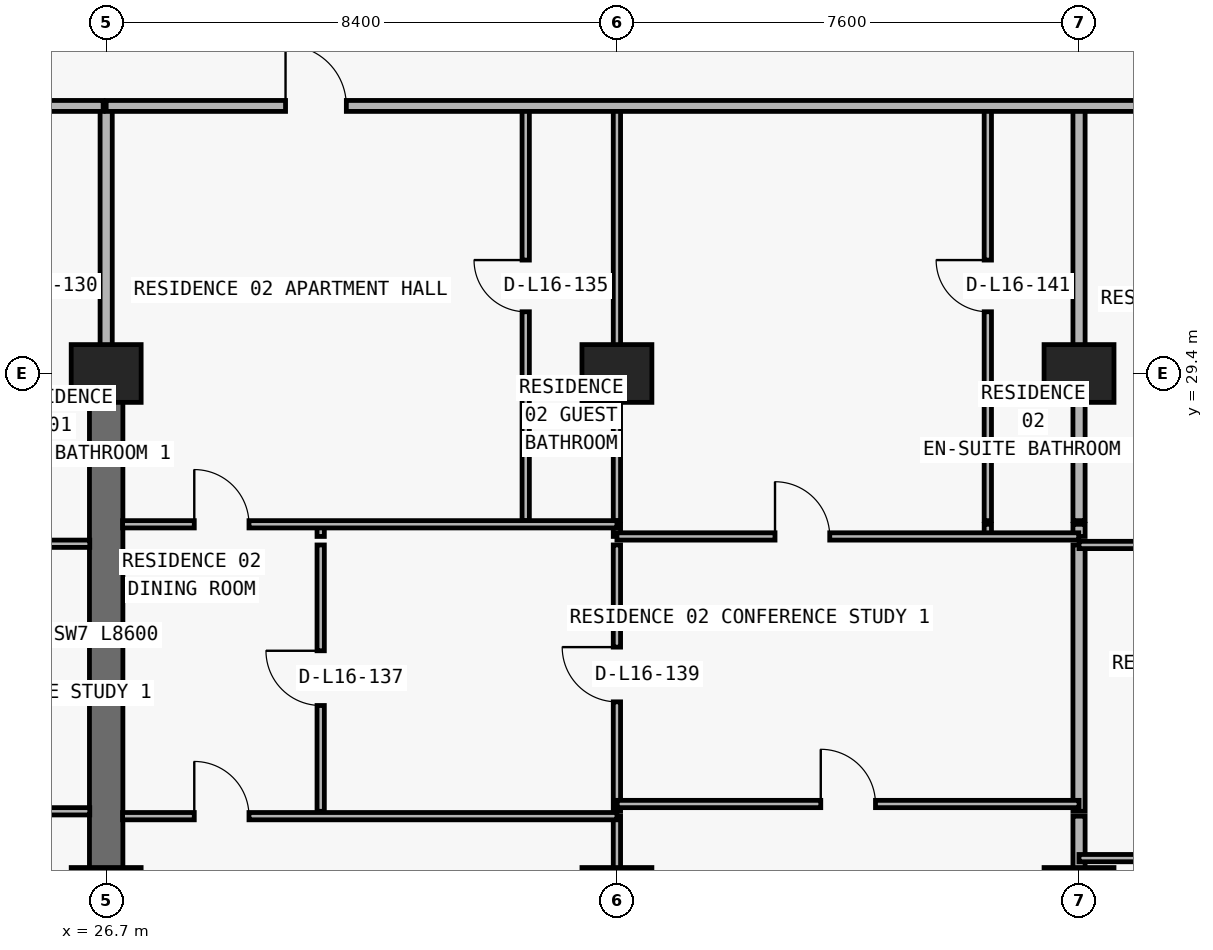
"""IFC4 building model, lengths in metres.
Left out: names, types, materials, properties, quantities, classifications, styles, units other than length and angle.
Written with IfcOpenShell. Run it as: python <this file> out.ifc"""

import sys

from ifc_helpers import new_model, si_unit, direction, frame, frame_2d, origin, origin_2d, place, context, subcontext, project, spatial, rectangle, extrude, element, fill, save


model = new_model("IFC4")
c1 = context("Model", 3, precision=1e-05, world=origin(), true_north=direction((0.0, 1.0)))
c2 = subcontext(c1, "Body", "Model", "MODEL_VIEW")
j1 = project(units=[si_unit("LENGTHUNIT", "METRE"), si_unit("PLANEANGLEUNIT", "RADIAN")], contexts=[c1])
p1 = place(None, origin())
s1 = spatial("IfcSite", under=j1, at=p1, CompositionType="ELEMENT")
p2 = place(p1, origin())
s2 = spatial("IfcBuilding", under=s1, at=p2, CompositionType="ELEMENT")
p3 = place(p2, frame((0.0, 0.0, 63.0)))
s3 = spatial("IfcBuildingStorey", under=s2, at=p3, CompositionType="ELEMENT", Elevation=63.0)
for number, where, z_axis, x_axis in (
    (1, (26.7, 20.8, 0.0), (0.0, 0.0, 1.0), (1.0, 0.0, 0.0)),
    (2, (35.1, 20.8, 0.0), (0.0, 0.0, 1.0), (1.0, 0.0, 0.0)),
    (3, (42.7, 20.8, 0.0), (0.0, 0.0, 1.0), (1.0, 0.0, 0.0)),
    (4, (26.7, 29.4, 0.0), (0.0, 0.0, 1.0), (1.0, 0.0, 0.0)),
    (5, (35.1, 29.4, 0.0), (0.0, 0.0, 1.0), (1.0, 0.0, 0.0)),
    (6, (42.7, 29.4, 0.0), (0.0, 0.0, 1.0), (1.0, 0.0, 0.0)),
):
    element("IfcColumn", number, at=place(p3, frame(where, z_axis=z_axis, x_axis=x_axis)), inside=s3, PredefinedType="COLUMN", context=c2, shape_type="SweptSolid", body=[
        extrude(rectangle(XDim=1.15, YDim=0.95, at=origin_2d()), origin(), (0.0, 0.0, 1.0), 3.05),
    ])
p4 = place(p3, frame((26.7, 20.8, 0.0), z_axis=(0.0, 0.0, 1.0), x_axis=(0.0, 1.0, 0.0)))
e7 = element("IfcWall", 7, at=p4, inside=s3, PredefinedType="SHEAR", context=c2, shape_type="SweptSolid", body=[
    extrude(rectangle(XDim=8.6, YDim=0.55, at=frame_2d((4.3, 0.0))), origin(), (0.0, 0.0, 1.0), 3.05),
])
p5 = place(p3, frame((26.7, 29.405, 0.0), z_axis=(0.0, 0.0, 1.0), x_axis=(0.0, 1.0, 0.0)))
e8 = element("IfcWall", 8, at=p5, inside=s3, PredefinedType="PARTITIONING", context=c2, shape_type="SweptSolid", body=[
    extrude(rectangle(XDim=4.395, YDim=0.2, at=frame_2d((2.198, 0.0))), origin(), (0.0, 0.0, 1.0), 2.335),
])
p6 = place(p3, frame((30.228, 22.2, 0.0), z_axis=(0.0, 0.0, 1.0), x_axis=(0.0, 1.0, 0.0)))
e9 = element("IfcWall", 9, at=p6, inside=s3, PredefinedType="PARTITIONING", context=c2, shape_type="SweptSolid", body=[
    extrude(rectangle(XDim=4.38, YDim=0.12, at=frame_2d((2.19, 0.0))), origin(), (0.0, 0.0, 1.0), 3.05),
])
p7 = place(p6, frame((1.74, 0.0, 0.0)))
e10 = element("IfcOpeningElement", 10, at=p7, cuts=e9, PredefinedType="OPENING", context=c2, shape_type="SweptSolid", body=[
    extrude(rectangle(XDim=0.9, YDim=2.15, at=frame_2d((0.45, 1.075))), frame((0.0, 0.07, 0.0), z_axis=(0.0, -1.0, 0.0), x_axis=(1.0, 0.0, 0.0)), (0.0, 0.0, 1.0), 0.14),
])
p8 = place(p3, frame((30.228, 26.72, 0.0), z_axis=(0.0, 0.0, 1.0), x_axis=(0.0, 1.0, 0.0)))
e11 = element("IfcWall", 11, at=p8, inside=s3, PredefinedType="PARTITIONING", context=c2, shape_type="SweptSolid", body=[
    extrude(rectangle(XDim=0.2, YDim=0.12, at=frame_2d((0.1, 0.0))), origin(), (0.0, 0.0, 1.0), 3.05),
])
p9 = place(p3, frame((33.6, 26.98, 0.0), z_axis=(0.0, 0.0, 1.0), x_axis=(0.0, 1.0, 0.0)))
e12 = element("IfcWall", 12, at=p9, inside=s3, PredefinedType="PARTITIONING", context=c2, shape_type="SweptSolid", body=[
    extrude(rectangle(XDim=6.82, YDim=0.12, at=frame_2d((3.41, 0.0))), origin(), (0.0, 0.0, 1.0), 3.05),
])
p10 = place(p9, frame((3.435, 0.0, 0.0)))
e13 = element("IfcOpeningElement", 13, at=p10, cuts=e12, PredefinedType="OPENING", context=c2, shape_type="SweptSolid", body=[
    extrude(rectangle(XDim=0.85, YDim=2.1, at=frame_2d((0.425, 1.05))), frame((0.0, 0.07, 0.0), z_axis=(0.0, -1.0, 0.0), x_axis=(1.0, 0.0, 0.0)), (0.0, 0.0, 1.0), 0.14),
])
p11 = place(p3, frame((35.1, 6.24, 0.0), z_axis=(0.0, 0.0, 1.0), x_axis=(0.0, 1.0, 0.0)))
e14 = element("IfcWall", 14, at=p11, inside=s3, PredefinedType="PARTITIONING", context=c2, shape_type="SweptSolid", body=[
    extrude(rectangle(XDim=15.88, YDim=0.12, at=frame_2d((7.94, 0.0))), origin(), (0.0, 0.0, 1.0), 2.11),
])
p12 = place(p3, frame((35.1, 22.2, 0.0), z_axis=(0.0, 0.0, 1.0), x_axis=(0.0, 1.0, 0.0)))
e15 = element("IfcWall", 15, at=p12, inside=s3, PredefinedType="PARTITIONING", context=c2, shape_type="SweptSolid", body=[
    extrude(rectangle(XDim=4.38, YDim=0.12, at=frame_2d((2.19, 0.0))), origin(), (0.0, 0.0, 1.0), 2.11),
])
p13 = place(p12, frame((1.8, 0.0, 0.0)))
e16 = element("IfcOpeningElement", 16, at=p13, cuts=e15, PredefinedType="OPENING", context=c2, shape_type="SweptSolid", body=[
    extrude(rectangle(XDim=0.9, YDim=2.06, at=frame_2d((0.45, 1.03))), frame((0.0, 0.07, 0.0), z_axis=(0.0, -1.0, 0.0), x_axis=(1.0, 0.0, 0.0)), (0.0, 0.0, 1.0), 0.14),
])
p14 = place(p3, frame((35.1, 26.72, 0.0), z_axis=(0.0, 0.0, 1.0), x_axis=(0.0, 1.0, 0.0)))
e17 = element("IfcWall", 17, at=p14, inside=s3, PredefinedType="PARTITIONING", context=c2, shape_type="SweptSolid", body=[
    extrude(rectangle(XDim=0.2, YDim=0.12, at=frame_2d((0.1, 0.0))), origin(), (0.0, 0.0, 1.0), 2.11),
])
p15 = place(p3, frame((35.1, 26.98, 0.0), z_axis=(0.0, 0.0, 1.0), x_axis=(0.0, 1.0, 0.0)))
e18 = element("IfcWall", 18, at=p15, inside=s3, PredefinedType="PARTITIONING", context=c2, shape_type="SweptSolid", body=[
    extrude(rectangle(XDim=6.82, YDim=0.12, at=frame_2d((3.41, 0.0))), origin(), (0.0, 0.0, 1.0), 2.11),
])
p16 = place(p3, frame((41.2, 26.72, 0.0), z_axis=(0.0, 0.0, 1.0), x_axis=(0.0, 1.0, 0.0)))
e19 = element("IfcWall", 19, at=p16, inside=s3, PredefinedType="PARTITIONING", context=c2, shape_type="SweptSolid", body=[
    extrude(rectangle(XDim=0.2, YDim=0.12, at=frame_2d((0.1, 0.0))), origin(), (0.0, 0.0, 1.0), 3.05),
])
p17 = place(p3, frame((41.2, 26.98, 0.0), z_axis=(0.0, 0.0, 1.0), x_axis=(0.0, 1.0, 0.0)))
e20 = element("IfcWall", 20, at=p17, inside=s3, PredefinedType="PARTITIONING", context=c2, shape_type="SweptSolid", body=[
    extrude(rectangle(XDim=6.82, YDim=0.12, at=frame_2d((3.41, 0.0))), origin(), (0.0, 0.0, 1.0), 3.05),
])
p18 = place(p17, frame((3.435, 0.0, 0.0)))
e21 = element("IfcOpeningElement", 21, at=p18, cuts=e20, PredefinedType="OPENING", context=c2, shape_type="SweptSolid", body=[
    extrude(rectangle(XDim=0.85, YDim=2.1, at=frame_2d((0.425, 1.05))), frame((0.0, 0.07, 0.0), z_axis=(0.0, -1.0, 0.0), x_axis=(1.0, 0.0, 0.0)), (0.0, 0.0, 1.0), 0.14),
])
p19 = place(p3, frame((42.7, 6.24, 0.0), z_axis=(0.0, 0.0, 1.0), x_axis=(0.0, 1.0, 0.0)))
e22 = element("IfcWall", 22, at=p19, inside=s3, PredefinedType="PARTITIONING", context=c2, shape_type="SweptSolid", body=[
    extrude(rectangle(XDim=15.88, YDim=0.2, at=frame_2d((7.94, 0.0))), origin(), (0.0, 0.0, 1.0), 2.11),
])
p20 = place(p3, frame((42.7, 22.2, 0.0), z_axis=(0.0, 0.0, 1.0), x_axis=(0.0, 1.0, 0.0)))
e23 = element("IfcWall", 23, at=p20, inside=s3, PredefinedType="PARTITIONING", context=c2, shape_type="SweptSolid", body=[
    extrude(rectangle(XDim=4.38, YDim=0.2, at=frame_2d((2.19, 0.0))), origin(), (0.0, 0.0, 1.0), 2.11),
])
p21 = place(p3, frame((42.7, 26.72, 0.0), z_axis=(0.0, 0.0, 1.0), x_axis=(0.0, 1.0, 0.0)))
e24 = element("IfcWall", 24, at=p21, inside=s3, PredefinedType="PARTITIONING", context=c2, shape_type="SweptSolid", body=[
    extrude(rectangle(XDim=0.2, YDim=0.2, at=frame_2d((0.1, 0.0))), origin(), (0.0, 0.0, 1.0), 2.11),
])
p22 = place(p3, frame((42.7, 26.98, 0.0), z_axis=(0.0, 0.0, 1.0), x_axis=(0.0, 1.0, 0.0)))
e25 = element("IfcWall", 25, at=p22, inside=s3, PredefinedType="PARTITIONING", context=c2, shape_type="SweptSolid", body=[
    extrude(rectangle(XDim=6.82, YDim=0.2, at=frame_2d((3.41, 0.0))), origin(), (0.0, 0.0, 1.0), 2.11),
])
p23 = place(p3, frame((42.7, 21.43, 0.0), z_axis=(0.0, 0.0, 1.0), x_axis=(1.0, 0.0, 0.0)))
e26 = element("IfcWall", 26, at=p23, inside=s3, PredefinedType="PARTITIONING", context=c2, shape_type="SweptSolid", body=[
    extrude(rectangle(XDim=8.13, YDim=0.12, at=frame_2d((4.065, 0.0))), origin(), (0.0, 0.0, 1.0), 3.05),
])
p24 = place(p23, frame((1.524, 0.0, 0.0)))
e27 = element("IfcOpeningElement", 27, at=p24, cuts=e26, PredefinedType="OPENING", context=c2, shape_type="SweptSolid", body=[
    extrude(rectangle(XDim=0.9, YDim=2.15, at=frame_2d((0.45, 1.075))), frame((0.0, 0.07, 0.0), z_axis=(0.0, -1.0, 0.0), x_axis=(1.0, 0.0, 0.0)), (0.0, 0.0, 1.0), 0.14),
])
p25 = place(p23, frame((5.758, 0.0, 0.0)))
e28 = element("IfcOpeningElement", 28, at=p25, cuts=e26, PredefinedType="OPENING", context=c2, shape_type="SweptSolid", body=[
    extrude(rectangle(XDim=0.9, YDim=2.15, at=frame_2d((0.45, 1.075))), frame((0.0, 0.07, 0.0), z_axis=(0.0, -1.0, 0.0), x_axis=(1.0, 0.0, 0.0)), (0.0, 0.0, 1.0), 0.14),
])
p26 = place(p3, frame((26.97, 22.12, 0.0), z_axis=(0.0, 0.0, 1.0), x_axis=(1.0, 0.0, 0.0)))
e29 = element("IfcWall", 29, at=p26, inside=s3, PredefinedType="PARTITIONING", context=c2, shape_type="SweptSolid", body=[
    extrude(rectangle(XDim=8.13, YDim=0.12, at=frame_2d((4.065, 0.0))), origin(), (0.0, 0.0, 1.0), 3.05),
])
p27 = place(p26, frame((1.179, 0.0, 0.0)))
e30 = element("IfcOpeningElement", 30, at=p27, cuts=e29, PredefinedType="OPENING", context=c2, shape_type="SweptSolid", body=[
    extrude(rectangle(XDim=0.9, YDim=2.15, at=frame_2d((0.45, 1.075))), frame((0.0, 0.07, 0.0), z_axis=(0.0, -1.0, 0.0), x_axis=(1.0, 0.0, 0.0)), (0.0, 0.0, 1.0), 0.14),
])
p28 = place(p3, frame((18.305, 22.2, 0.0), z_axis=(0.0, 0.0, 1.0), x_axis=(1.0, 0.0, 0.0)))
e31 = element("IfcWall", 31, at=p28, inside=s3, PredefinedType="PARTITIONING", context=c2, shape_type="SweptSolid", body=[
    extrude(rectangle(XDim=8.125, YDim=0.12, at=frame_2d((4.062, 0.0))), origin(), (0.0, 0.0, 1.0), 3.05),
])
p29 = place(p28, frame((3.613, 0.0, 0.0)))
e32 = element("IfcOpeningElement", 32, at=p29, cuts=e31, PredefinedType="OPENING", context=c2, shape_type="SweptSolid", body=[
    extrude(rectangle(XDim=0.9, YDim=2.15, at=frame_2d((0.45, 1.075))), frame((0.0, 0.07, 0.0), z_axis=(0.0, -1.0, 0.0), x_axis=(1.0, 0.0, 0.0)), (0.0, 0.0, 1.0), 0.14),
])
p30 = place(p3, frame((35.105, 22.32, 0.0), z_axis=(0.0, 0.0, 1.0), x_axis=(1.0, 0.0, 0.0)))
e33 = element("IfcWall", 33, at=p30, inside=s3, PredefinedType="PARTITIONING", context=c2, shape_type="SweptSolid", body=[
    extrude(rectangle(XDim=7.595, YDim=0.12, at=frame_2d((3.797, 0.0))), origin(), (0.0, 0.0, 1.0), 3.05),
])
p31 = place(p30, frame((3.347, 0.0, 0.0)))
e34 = element("IfcOpeningElement", 34, at=p31, cuts=e33, PredefinedType="OPENING", context=c2, shape_type="SweptSolid", body=[
    extrude(rectangle(XDim=0.9, YDim=2.15, at=frame_2d((0.45, 1.075))), frame((0.0, 0.07, 0.0), z_axis=(0.0, -1.0, 0.0), x_axis=(1.0, 0.0, 0.0)), (0.0, 0.0, 1.0), 0.14),
])
p32 = place(p3, frame((42.7, 26.58, 0.0), z_axis=(0.0, 0.0, 1.0), x_axis=(1.0, 0.0, 0.0)))
e35 = element("IfcWall", 35, at=p32, inside=s3, PredefinedType="PARTITIONING", context=c2, shape_type="SweptSolid", body=[
    extrude(rectangle(XDim=8.13, YDim=0.12, at=frame_2d((4.065, 0.0))), origin(), (0.0, 0.0, 1.0), 3.05),
])
p33 = place(p32, frame((1.693, 0.0, 0.0)))
e36 = element("IfcOpeningElement", 36, at=p33, cuts=e35, PredefinedType="OPENING", context=c2, shape_type="SweptSolid", body=[
    extrude(rectangle(XDim=0.9, YDim=2.15, at=frame_2d((0.45, 1.075))), frame((0.0, 0.07, 0.0), z_axis=(0.0, -1.0, 0.0), x_axis=(1.0, 0.0, 0.0)), (0.0, 0.0, 1.0), 0.14),
])
p34 = place(p3, frame((18.3, 26.6, 0.0), z_axis=(0.0, 0.0, 1.0), x_axis=(1.0, 0.0, 0.0)))
e37 = element("IfcWall", 37, at=p34, inside=s3, PredefinedType="PARTITIONING", context=c2, shape_type="SweptSolid", body=[
    extrude(rectangle(XDim=8.13, YDim=0.12, at=frame_2d((4.065, 0.0))), origin(), (0.0, 0.0, 1.0), 3.05),
])
p35 = place(p34, frame((3.0, 0.0, 0.0)))
e38 = element("IfcOpeningElement", 38, at=p35, cuts=e37, PredefinedType="OPENING", context=c2, shape_type="SweptSolid", body=[
    extrude(rectangle(XDim=0.9, YDim=2.15, at=frame_2d((0.45, 1.075))), frame((0.0, 0.07, 0.0), z_axis=(0.0, -1.0, 0.0), x_axis=(1.0, 0.0, 0.0)), (0.0, 0.0, 1.0), 0.14),
])
p36 = place(p3, frame((35.1, 26.72, 0.0), z_axis=(0.0, 0.0, 1.0), x_axis=(1.0, 0.0, 0.0)))
e39 = element("IfcWall", 39, at=p36, inside=s3, PredefinedType="PARTITIONING", context=c2, shape_type="SweptSolid", body=[
    extrude(rectangle(XDim=7.595, YDim=0.12, at=frame_2d((3.797, 0.0))), origin(), (0.0, 0.0, 1.0), 3.05),
])
p37 = place(p36, frame((2.6, 0.0, 0.0)))
e40 = element("IfcOpeningElement", 40, at=p37, cuts=e39, PredefinedType="OPENING", context=c2, shape_type="SweptSolid", body=[
    extrude(rectangle(XDim=0.9, YDim=2.15, at=frame_2d((0.45, 1.075))), frame((0.0, 0.07, 0.0), z_axis=(0.0, -1.0, 0.0), x_axis=(1.0, 0.0, 0.0)), (0.0, 0.0, 1.0), 0.14),
])
p38 = place(p3, frame((26.97, 26.92, 0.0), z_axis=(0.0, 0.0, 1.0), x_axis=(1.0, 0.0, 0.0)))
e41 = element("IfcWall", 41, at=p38, inside=s3, PredefinedType="PARTITIONING", context=c2, shape_type="SweptSolid", body=[
    extrude(rectangle(XDim=8.13, YDim=0.12, at=frame_2d((4.065, 0.0))), origin(), (0.0, 0.0, 1.0), 3.05),
])
p39 = place(p38, frame((1.179, 0.0, 0.0)))
e42 = element("IfcOpeningElement", 42, at=p39, cuts=e41, PredefinedType="OPENING", context=c2, shape_type="SweptSolid", body=[
    extrude(rectangle(XDim=0.9, YDim=2.15, at=frame_2d((0.45, 1.075))), frame((0.0, 0.07, 0.0), z_axis=(0.0, -1.0, 0.0), x_axis=(1.0, 0.0, 0.0)), (0.0, 0.0, 1.0), 0.14),
])
p40 = place(p3, frame((5.105, 33.8, 0.0), z_axis=(0.0, 0.0, 1.0), x_axis=(1.0, 0.0, 0.0)))
e43 = element("IfcWall", 43, at=p40, inside=s3, PredefinedType="PARTITIONING", context=c2, shape_type="SweptSolid", body=[
    extrude(rectangle(XDim=21.545, YDim=0.18, at=frame_2d((10.772, 0.0))), origin(), (0.0, 0.0, 1.0), 3.05),
])
p41 = place(p40, frame((7.745, 0.0, 0.0)))
e44 = element("IfcOpeningElement", 44, at=p41, cuts=e43, PredefinedType="OPENING", context=c2, shape_type="SweptSolid", body=[
    extrude(rectangle(XDim=1.0, YDim=2.2, at=frame_2d((0.5, 1.1))), frame((0.0, 0.1, 0.0), z_axis=(0.0, -1.0, 0.0), x_axis=(1.0, 0.0, 0.0)), (0.0, 0.0, 1.0), 0.2),
])
p42 = place(p3, frame((26.7, 33.8, 0.0), z_axis=(0.0, 0.0, 1.0), x_axis=(1.0, 0.0, 0.0)))
e45 = element("IfcWall", 45, at=p42, inside=s3, PredefinedType="PARTITIONING", context=c2, shape_type="SweptSolid", body=[
    extrude(rectangle(XDim=46.0, YDim=0.18, at=frame_2d((23.0, 0.0))), origin(), (0.0, 0.0, 1.0), 3.05),
])
p43 = place(p42, frame((2.95, 0.0, 0.0)))
e46 = element("IfcOpeningElement", 46, at=p43, cuts=e45, PredefinedType="OPENING", context=c2, shape_type="SweptSolid", body=[
    extrude(rectangle(XDim=1.0, YDim=2.2, at=frame_2d((0.5, 1.1))), frame((0.0, 0.1, 0.0), z_axis=(0.0, -1.0, 0.0), x_axis=(1.0, 0.0, 0.0)), (0.0, 0.0, 1.0), 0.2),
])
p44 = place(p42, frame((18.875, 0.0, 0.0)))
e47 = element("IfcOpeningElement", 47, at=p44, cuts=e45, PredefinedType="OPENING", context=c2, shape_type="SweptSolid", body=[
    extrude(rectangle(XDim=1.0, YDim=2.2, at=frame_2d((0.5, 1.1))), frame((0.0, 0.1, 0.0), z_axis=(0.0, -1.0, 0.0), x_axis=(1.0, 0.0, 0.0)), (0.0, 0.0, 1.0), 0.2),
])
p45 = place(p42, frame((27.275, 0.0, 0.0)))
e48 = element("IfcOpeningElement", 48, at=p45, cuts=e45, PredefinedType="OPENING", context=c2, shape_type="SweptSolid", body=[
    extrude(rectangle(XDim=1.0, YDim=2.2, at=frame_2d((0.5, 1.1))), frame((0.0, 0.1, 0.0), z_axis=(0.0, -1.0, 0.0), x_axis=(1.0, 0.0, 0.0)), (0.0, 0.0, 1.0), 0.2),
])
p46 = place(p42, frame((35.675, 0.0, 0.0)))
e49 = element("IfcOpeningElement", 49, at=p46, cuts=e45, PredefinedType="OPENING", context=c2, shape_type="SweptSolid", body=[
    extrude(rectangle(XDim=1.0, YDim=2.2, at=frame_2d((0.5, 1.1))), frame((0.0, 0.1, 0.0), z_axis=(0.0, -1.0, 0.0), x_axis=(1.0, 0.0, 0.0)), (0.0, 0.0, 1.0), 0.2),
])
p47 = place(p43, origin())
e50 = element("IfcDoor", 50, at=p47, inside=s3, OperationType="SINGLE_SWING_LEFT", PredefinedType="DOOR", context=c2, shape_type="SweptSolid", body=[
    extrude(rectangle(XDim=1.0, YDim=2.2, at=frame_2d((0.5, 1.1))), frame((0.0, 0.025, 0.0), z_axis=(0.0, -1.0, 0.0), x_axis=(1.0, 0.0, 0.0)), (0.0, 0.0, 1.0), 0.05),
])
fill(e46, e50)
p48 = place(p10, origin())
e51 = element("IfcDoor", 51, at=p48, inside=s3, OperationType="SINGLE_SWING_RIGHT", PredefinedType="DOOR", context=c2, shape_type="SweptSolid", body=[
    extrude(rectangle(XDim=0.85, YDim=2.1, at=frame_2d((0.425, 1.05))), frame((0.0, 0.025, 0.0), z_axis=(0.0, -1.0, 0.0), x_axis=(1.0, 0.0, 0.0)), (0.0, 0.0, 1.0), 0.05),
])
fill(e13, e51)
p49 = place(p39, origin())
e52 = element("IfcDoor", 52, at=p49, inside=s3, OperationType="SINGLE_SWING_LEFT", PredefinedType="DOOR", context=c2, shape_type="SweptSolid", body=[
    extrude(rectangle(XDim=0.9, YDim=2.15, at=frame_2d((0.45, 1.075))), frame((0.0, 0.025, 0.0), z_axis=(0.0, -1.0, 0.0), x_axis=(1.0, 0.0, 0.0)), (0.0, 0.0, 1.0), 0.05),
])
fill(e42, e52)
p50 = place(p7, origin())
e53 = element("IfcDoor", 53, at=p50, inside=s3, OperationType="SINGLE_SWING_RIGHT", PredefinedType="DOOR", context=c2, shape_type="SweptSolid", body=[
    extrude(rectangle(XDim=0.9, YDim=2.15, at=frame_2d((0.45, 1.075))), frame((0.0, 0.025, 0.0), z_axis=(0.0, -1.0, 0.0), x_axis=(1.0, 0.0, 0.0)), (0.0, 0.0, 1.0), 0.05),
])
fill(e10, e53)
p51 = place(p27, origin())
e54 = element("IfcDoor", 54, at=p51, inside=s3, OperationType="SINGLE_SWING_LEFT", PredefinedType="DOOR", context=c2, shape_type="SweptSolid", body=[
    extrude(rectangle(XDim=0.9, YDim=2.15, at=frame_2d((0.45, 1.075))), frame((0.0, 0.025, 0.0), z_axis=(0.0, -1.0, 0.0), x_axis=(1.0, 0.0, 0.0)), (0.0, 0.0, 1.0), 0.05),
])
fill(e30, e54)
p52 = place(p13, origin())
e55 = element("IfcDoor", 55, at=p52, inside=s3, OperationType="SINGLE_SWING_RIGHT", PredefinedType="DOOR", context=c2, shape_type="SweptSolid", body=[
    extrude(rectangle(XDim=0.9, YDim=2.06, at=frame_2d((0.45, 1.03))), frame((0.0, 0.025, 0.0), z_axis=(0.0, -1.0, 0.0), x_axis=(1.0, 0.0, 0.0)), (0.0, 0.0, 1.0), 0.05),
])
fill(e16, e55)
p53 = place(p37, origin())
e56 = element("IfcDoor", 56, at=p53, inside=s3, OperationType="SINGLE_SWING_LEFT", PredefinedType="DOOR", context=c2, shape_type="SweptSolid", body=[
    extrude(rectangle(XDim=0.9, YDim=2.15, at=frame_2d((0.45, 1.075))), frame((0.0, 0.025, 0.0), z_axis=(0.0, -1.0, 0.0), x_axis=(1.0, 0.0, 0.0)), (0.0, 0.0, 1.0), 0.05),
])
fill(e40, e56)
p54 = place(p18, origin())
e57 = element("IfcDoor", 57, at=p54, inside=s3, OperationType="SINGLE_SWING_RIGHT", PredefinedType="DOOR", context=c2, shape_type="SweptSolid", body=[
    extrude(rectangle(XDim=0.85, YDim=2.1, at=frame_2d((0.425, 1.05))), frame((0.0, 0.025, 0.0), z_axis=(0.0, -1.0, 0.0), x_axis=(1.0, 0.0, 0.0)), (0.0, 0.0, 1.0), 0.05),
])
fill(e21, e57)
p55 = place(p31, origin())
e58 = element("IfcDoor", 58, at=p55, inside=s3, OperationType="SINGLE_SWING_LEFT", PredefinedType="DOOR", context=c2, shape_type="SweptSolid", body=[
    extrude(rectangle(XDim=0.9, YDim=2.15, at=frame_2d((0.45, 1.075))), frame((0.0, 0.025, 0.0), z_axis=(0.0, -1.0, 0.0), x_axis=(1.0, 0.0, 0.0)), (0.0, 0.0, 1.0), 0.05),
])
fill(e34, e58)
save(model, sys.argv[1])
